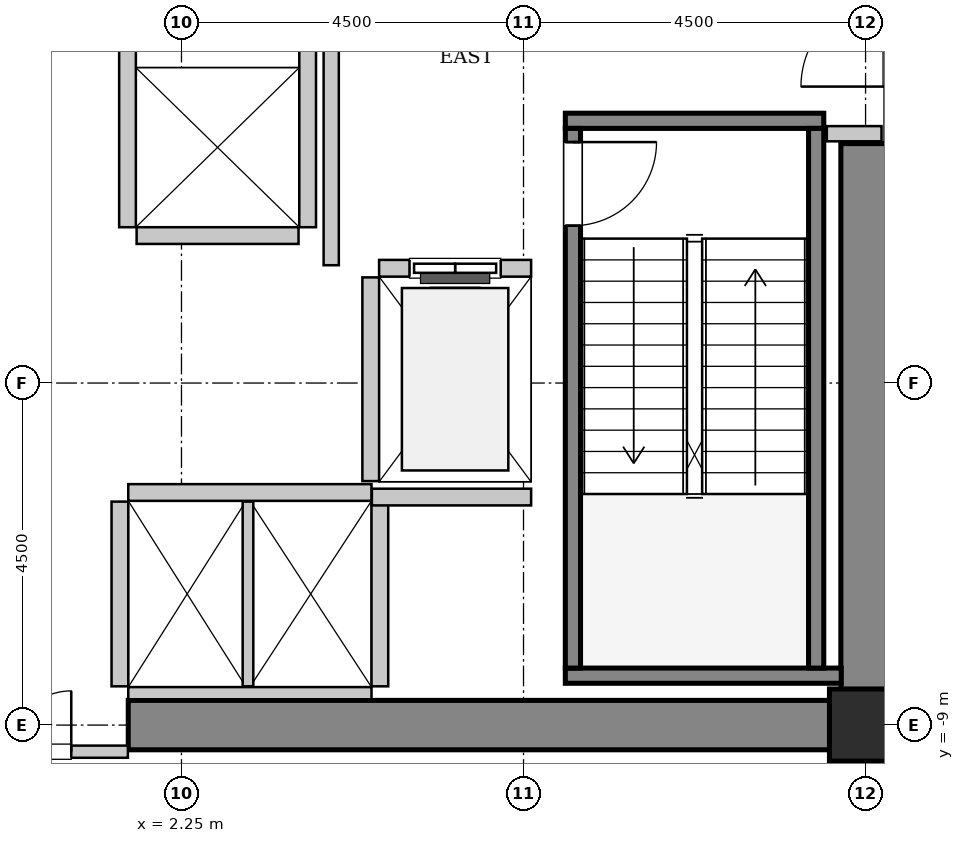
"""IFC4 building model, lengths in metres.
Left out: names, types, materials, properties, quantities, classifications, styles, units other than length and angle.
Written with IfcOpenShell. Run it as: python <this file> out.ifc"""

import sys

from ifc_helpers import new_model, si_unit, direction, frame, frame_2d, origin, origin_2d, place, context, subcontext, project, spatial, rectangle, hollow_rectangle, extrude, source, transform, mapped, element, fill, save


model = new_model("IFC4")
c1 = context("Model", 3, precision=1e-05, world=origin(), true_north=direction((0.0, 1.0)))
c2 = subcontext(c1, "Body", "Model", "MODEL_VIEW")
j1 = project(units=[si_unit("LENGTHUNIT", "METRE"), si_unit("PLANEANGLEUNIT", "RADIAN")], contexts=[c1])
p1 = place(None, origin())
s1 = spatial("IfcSite", under=j1, at=p1, CompositionType="ELEMENT")
p2 = place(p1, origin())
s2 = spatial("IfcBuilding", under=s1, at=p2, CompositionType="ELEMENT")
p3 = place(p2, frame((0.0, 0.0, 86.2)))
s3 = spatial("IfcBuildingStorey", under=s2, at=p3, CompositionType="ELEMENT", Elevation=86.2)
m1 = source(origin(), c2, "Body", "SweptSolid", [
    extrude(rectangle(XDim=10.025, YDim=0.65, at=frame_2d((5.012, 0.0))), origin(), (0.0, 0.0, 1.0), 4.6),
])
p4 = place(p3, frame((1.55, -9.0, 0.0), z_axis=(0.0, 0.0, 1.0), x_axis=(1.0, 0.0, 0.0)))
e1 = element("IfcWall", 1, at=p4, inside=s3, PredefinedType="SHEAR", context=c2, shape_type="MappedRepresentation", body=[
    mapped(m1, transform((0.0, 0.0, 0.0), x_axis=(1.0, 0.0, 0.0), y_axis=(0.0, 1.0, 0.0), z_axis=(0.0, 0.0, 1.0), scale=1.0)),
])
m2 = source(origin(), c2, "Body", "SweptSolid", [
    extrude(rectangle(XDim=7.325, YDim=0.65, at=frame_2d((3.663, 0.0))), origin(), (0.0, 0.0, 1.0), 4.6),
])
p5 = place(p3, frame((11.25, -8.675, 0.0), z_axis=(0.0, 0.0, 1.0), x_axis=(0.0, 1.0, 0.0)))
e2 = element("IfcWall", 2, at=p5, inside=s3, PredefinedType="SHEAR", context=c2, shape_type="MappedRepresentation", body=[
    mapped(m2, transform((0.0, 0.0, 0.0), x_axis=(1.0, 0.0, 0.0), y_axis=(0.0, 1.0, 0.0), z_axis=(0.0, 0.0, 1.0), scale=1.0)),
])
m3 = source(origin(), c2, "Body", "SweptSolid", [
    extrude(hollow_rectangle(XDim=0.95, YDim=0.95, WallThickness=0.045, InnerFilletRadius=0.045, OuterFilletRadius=0.09, at=origin_2d()), origin(), (0.0, 0.0, 1.0), 4.6),
])
p6 = place(p3, frame((11.25, -9.0, 0.0), z_axis=(0.0, 0.0, 1.0), x_axis=(1.0, 0.0, 0.0)))
e3 = element("IfcColumn", 3, at=p6, inside=s3, PredefinedType="COLUMN", context=c2, shape_type="MappedRepresentation", body=[
    mapped(m3, transform((0.0, 0.0, 0.0), x_axis=(1.0, 0.0, 0.0), y_axis=(0.0, 1.0, 0.0), z_axis=(0.0, 0.0, 1.0), scale=1.0)),
])
m4 = source(origin(), c2, "Body", "SweptSolid", [
    extrude(rectangle(XDim=3.4, YDim=0.2, at=frame_2d((1.7, 0.0))), origin(), (0.0, 0.0, 1.0), 4.6),
])
p7 = place(p3, frame((7.3, -1.05, 0.0), z_axis=(0.0, 0.0, 1.0), x_axis=(1.0, 0.0, 0.0)))
e4 = element("IfcWall", 4, at=p7, inside=s3, PredefinedType="SOLIDWALL", context=c2, shape_type="MappedRepresentation", body=[
    mapped(m4, transform((0.0, 0.0, 0.0), x_axis=(1.0, 0.0, 0.0), y_axis=(0.0, 1.0, 0.0), z_axis=(0.0, 0.0, 1.0), scale=1.0)),
])
m5 = source(origin(), c2, "Body", "SweptSolid", [
    extrude(rectangle(XDim=3.63, YDim=0.2, at=frame_2d((1.815, 0.0))), origin(), (0.0, 0.0, 1.0), 4.6),
])
p8 = place(p3, frame((7.3, -8.35, 0.0), z_axis=(0.0, 0.0, 1.0), x_axis=(1.0, 0.0, 0.0)))
e5 = element("IfcWall", 5, at=p8, inside=s3, PredefinedType="SOLIDWALL", context=c2, shape_type="MappedRepresentation", body=[
    mapped(m5, transform((0.0, 0.0, 0.0), x_axis=(1.0, 0.0, 0.0), y_axis=(0.0, 1.0, 0.0), z_axis=(0.0, 0.0, 1.0), scale=1.0)),
])
m6 = source(origin(), c2, "Body", "SweptSolid", [
    extrude(rectangle(XDim=7.1, YDim=0.2, at=frame_2d((3.55, 0.0))), origin(), (0.0, 0.0, 1.0), 4.6),
])
p9 = place(p3, frame((7.4, -1.15, 0.0), z_axis=(0.0, 0.0, 1.0), x_axis=(0.0, -1.0, 0.0)))
e6 = element("IfcWall", 6, at=p9, inside=s3, PredefinedType="SOLIDWALL", context=c2, shape_type="MappedRepresentation", body=[
    mapped(m6, transform((0.0, 0.0, 0.0), x_axis=(1.0, 0.0, 0.0), y_axis=(0.0, 1.0, 0.0), z_axis=(0.0, 0.0, 1.0), scale=1.0)),
])
p10 = place(p9, frame((0.18, 0.0, 0.0)))
e7 = element("IfcOpeningElement", 7, at=p10, cuts=e6, PredefinedType="OPENING", context=c2, shape_type="SweptSolid", body=[
    extrude(rectangle(XDim=1.1, YDim=2.15, at=frame_2d((0.55, 1.075))), frame((0.0, 0.11, 0.0), z_axis=(0.0, -1.0, 0.0), x_axis=(1.0, 0.0, 0.0)), (0.0, 0.0, 1.0), 0.22),
])
p11 = place(p3, frame((10.6, -1.15, 0.0), z_axis=(0.0, 0.0, 1.0), x_axis=(0.0, -1.0, 0.0)))
e8 = element("IfcWall", 8, at=p11, inside=s3, PredefinedType="SOLIDWALL", context=c2, shape_type="MappedRepresentation", body=[
    mapped(m6, transform((0.0, 0.0, 0.0), x_axis=(1.0, 0.0, 0.0), y_axis=(0.0, 1.0, 0.0), z_axis=(0.0, 0.0, 1.0), scale=1.0)),
])
m7 = source(origin(), c2, "Body", "SweptSolid", [
    extrude(rectangle(XDim=2.0, YDim=0.22, at=frame_2d((1.0, 0.0))), origin(), (0.0, 0.0, 1.0), 4.335),
])
p12 = place(p3, frame((6.85, -2.99, 0.0), z_axis=(0.0, 0.0, 1.0), x_axis=(-1.0, 0.0, 0.0)))
e9 = element("IfcWall", 9, at=p12, inside=s3, PredefinedType="SOLIDWALL", context=c2, shape_type="MappedRepresentation", body=[
    mapped(m7, transform((0.0, 0.0, 0.0), x_axis=(1.0, 0.0, 0.0), y_axis=(0.0, 1.0, 0.0), z_axis=(0.0, 0.0, 1.0), scale=1.0)),
])
p13 = place(p12, frame((0.4, 0.0, 0.0)))
e10 = element("IfcOpeningElement", 10, at=p13, cuts=e9, PredefinedType="OPENING", context=c2, shape_type="SweptSolid", body=[
    extrude(rectangle(XDim=1.2, YDim=2.2, at=frame_2d((0.6, 1.1))), frame((0.0, 0.12, 0.0), z_axis=(0.0, -1.0, 0.0), x_axis=(1.0, 0.0, 0.0)), (0.0, 0.0, 1.0), 0.24),
])
m8 = source(origin(), c2, "Body", "SweptSolid", [
    extrude(rectangle(XDim=2.68, YDim=0.22, at=frame_2d((1.34, 0.0))), origin(), (0.0, 0.0, 1.0), 4.335),
])
p14 = place(p3, frame((4.74, -3.11, 0.0), z_axis=(0.0, 0.0, 1.0), x_axis=(0.0, -1.0, 0.0)))
e11 = element("IfcWall", 11, at=p14, inside=s3, PredefinedType="SOLIDWALL", context=c2, shape_type="MappedRepresentation", body=[
    mapped(m8, transform((0.0, 0.0, 0.0), x_axis=(1.0, 0.0, 0.0), y_axis=(0.0, 1.0, 0.0), z_axis=(0.0, 0.0, 1.0), scale=1.0)),
])
m9 = source(origin(), c2, "Body", "SweptSolid", [
    extrude(rectangle(XDim=3.2, YDim=0.22, at=frame_2d((1.6, 0.0))), origin(), (0.0, 0.0, 1.0), 4.335),
])
p15 = place(p3, frame((4.75, -5.94, 0.0), z_axis=(0.0, 0.0, 1.0), x_axis=(-1.0, 0.0, 0.0)))
e12 = element("IfcWall", 12, at=p15, inside=s3, PredefinedType="SOLIDWALL", context=c2, shape_type="MappedRepresentation", body=[
    mapped(m9, transform((0.0, 0.0, 0.0), x_axis=(1.0, 0.0, 0.0), y_axis=(0.0, 1.0, 0.0), z_axis=(0.0, 0.0, 1.0), scale=1.0)),
])
m10 = source(origin(), c2, "Body", "SweptSolid", [
    extrude(rectangle(XDim=3.2, YDim=0.16, at=frame_2d((1.6, 0.0))), origin(), (0.0, 0.0, 1.0), 3.225),
])
p16 = place(p3, frame((1.55, -8.58, 0.0), z_axis=(0.0, 0.0, 1.0), x_axis=(1.0, 0.0, 0.0)))
e13 = element("IfcWall", 13, at=p16, inside=s3, PredefinedType="PARTITIONING", context=c2, shape_type="MappedRepresentation", body=[
    mapped(m10, transform((0.0, 0.0, 0.0), x_axis=(1.0, 0.0, 0.0), y_axis=(0.0, 1.0, 0.0), z_axis=(0.0, 0.0, 1.0), scale=1.0)),
])
m11 = source(origin(), c2, "Body", "SweptSolid", [
    extrude(rectangle(XDim=2.43, YDim=0.22, at=frame_2d((1.215, 0.0))), origin(), (0.0, 0.0, 1.0), 4.335),
])
p17 = place(p3, frame((1.44, -6.06, 0.0), z_axis=(0.0, 0.0, 1.0), x_axis=(0.0, -1.0, 0.0)))
e14 = element("IfcWall", 14, at=p17, inside=s3, PredefinedType="SOLIDWALL", context=c2, shape_type="MappedRepresentation", body=[
    mapped(m11, transform((0.0, 0.0, 0.0), x_axis=(1.0, 0.0, 0.0), y_axis=(0.0, 1.0, 0.0), z_axis=(0.0, 0.0, 1.0), scale=1.0)),
])
m12 = source(origin(), c2, "Body", "SweptSolid", [
    extrude(rectangle(XDim=2.43, YDim=0.14, at=frame_2d((1.215, 0.0))), origin(), (0.0, 0.0, 1.0), 4.335),
])
p18 = place(p3, frame((3.125, -8.49, 0.0), z_axis=(0.0, 0.0, 1.0), x_axis=(0.0, 1.0, 0.0)))
e15 = element("IfcWall", 15, at=p18, inside=s3, PredefinedType="PARTITIONING", context=c2, shape_type="MappedRepresentation", body=[
    mapped(m12, transform((0.0, 0.0, 0.0), x_axis=(1.0, 0.0, 0.0), y_axis=(0.0, 1.0, 0.0), z_axis=(0.0, 0.0, 1.0), scale=1.0)),
])
p19 = place(p3, frame((4.86, -8.49, 0.0), z_axis=(0.0, 0.0, 1.0), x_axis=(0.0, 1.0, 0.0)))
e16 = element("IfcWall", 16, at=p19, inside=s3, PredefinedType="SOLIDWALL", context=c2, shape_type="MappedRepresentation", body=[
    mapped(m11, transform((0.0, 0.0, 0.0), x_axis=(1.0, 0.0, 0.0), y_axis=(0.0, 1.0, 0.0), z_axis=(0.0, 0.0, 1.0), scale=1.0)),
])
m13 = source(origin(), c2, "Body", "SweptSolid", [
    extrude(rectangle(XDim=4.9, YDim=0.22, at=frame_2d((2.45, 0.0))), origin(), (0.0, 0.0, 1.0), 4.335),
])
for number, where, z_axis, x_axis in (
    (17, (1.54, 2.45, 0.0), (0.0, 0.0, 1.0), (0.0, -1.0, 0.0)),
    (18, (3.91, -2.45, 0.0), (0.0, 0.0, 1.0), (0.0, 1.0, 0.0)),
):
    element("IfcWall", number, at=place(p3, frame(where, z_axis=z_axis, x_axis=x_axis)), inside=s3, PredefinedType="SOLIDWALL", context=c2, shape_type="MappedRepresentation", body=[
        mapped(m13, transform((0.0, 0.0, 0.0), x_axis=(1.0, 0.0, 0.0), y_axis=(0.0, 1.0, 0.0), z_axis=(0.0, 0.0, 1.0), scale=1.0)),
    ])
m14 = source(origin(), c2, "Body", "SweptSolid", [
    extrude(rectangle(XDim=2.13, YDim=0.22, at=frame_2d((1.065, 0.0))), origin(), (0.0, 0.0, 1.0), 4.335),
])
p20 = place(p3, frame((1.66, -2.56, 0.0), z_axis=(0.0, 0.0, 1.0), x_axis=(1.0, 0.0, 0.0)))
e19 = element("IfcWall", 19, at=p20, inside=s3, PredefinedType="SOLIDWALL", context=c2, shape_type="MappedRepresentation", body=[
    mapped(m14, transform((0.0, 0.0, 0.0), x_axis=(1.0, 0.0, 0.0), y_axis=(0.0, 1.0, 0.0), z_axis=(0.0, 0.0, 1.0), scale=1.0)),
])
m15 = source(origin(), c2, "Body", "SweptSolid", [
    extrude(rectangle(XDim=2.095, YDim=0.22, at=frame_2d((1.048, 0.0))), origin(), (0.0, 0.0, 1.0), 4.335),
])
p21 = place(p3, frame((4.755, -6.0, 0.0), z_axis=(0.0, 0.0, 1.0), x_axis=(1.0, 0.0, 0.0)))
e20 = element("IfcWall", 20, at=p21, inside=s3, PredefinedType="SOLIDWALL", context=c2, shape_type="MappedRepresentation", body=[
    mapped(m15, transform((0.0, 0.0, 0.0), x_axis=(1.0, 0.0, 0.0), y_axis=(0.0, 1.0, 0.0), z_axis=(0.0, 0.0, 1.0), scale=1.0)),
])
m16 = source(origin(), c2, "Body", "SweptSolid", [
    extrude(rectangle(XDim=5.9, YDim=0.2, at=frame_2d((2.95, 0.0))), origin(), (0.0, 0.0, 1.0), 4.335),
])
p22 = place(p3, frame((4.22, -2.95, 0.0), z_axis=(0.0, 0.0, 1.0), x_axis=(0.0, 1.0, 0.0)))
e21 = element("IfcWall", 21, at=p22, inside=s3, PredefinedType="PARTITIONING", context=c2, shape_type="MappedRepresentation", body=[
    mapped(m16, transform((0.0, 0.0, 0.0), x_axis=(1.0, 0.0, 0.0), y_axis=(0.0, 1.0, 0.0), z_axis=(0.0, 0.0, 1.0), scale=1.0)),
])
m17 = source(origin(), c2, "Body", "SweptSolid", [
    extrude(rectangle(XDim=0.72, YDim=0.2, at=frame_2d((0.36, 0.0))), origin(), (0.0, 0.0, 1.0), 4.335),
])
p23 = place(p3, frame((10.74, -1.22, 0.0), z_axis=(0.0, 0.0, 1.0), x_axis=(1.0, 0.0, 0.0)))
e22 = element("IfcWall", 22, at=p23, inside=s3, PredefinedType="PARTITIONING", context=c2, shape_type="MappedRepresentation", body=[
    mapped(m17, transform((0.0, 0.0, 0.0), x_axis=(1.0, 0.0, 0.0), y_axis=(0.0, 1.0, 0.0), z_axis=(0.0, 0.0, 1.0), scale=1.0)),
])
m18 = source(origin(), c2, "Body", "SweptSolid", [
    extrude(rectangle(XDim=3.09, YDim=0.16, at=frame_2d((1.545, 0.0))), origin(), (0.0, 0.0, 1.0), 3.225),
])
p24 = place(p3, frame((-1.545, -9.35, 0.0), z_axis=(0.0, 0.0, 1.0), x_axis=(1.0, 0.0, 0.0)))
e23 = element("IfcWall", 23, at=p24, inside=s3, PredefinedType="PARTITIONING", context=c2, shape_type="MappedRepresentation", body=[
    mapped(m18, transform((0.0, 0.0, 0.0), x_axis=(1.0, 0.0, 0.0), y_axis=(0.0, 1.0, 0.0), z_axis=(0.0, 0.0, 1.0), scale=1.0)),
])
p25 = place(p24, frame((0.745, 0.0, 0.0)))
e24 = element("IfcOpeningElement", 24, at=p25, cuts=e23, PredefinedType="OPENING", context=c2, shape_type="SweptSolid", body=[
    extrude(rectangle(XDim=1.6, YDim=2.3, at=frame_2d((0.8, 1.15))), frame((0.0, 0.09, 0.0), z_axis=(0.0, -1.0, 0.0), x_axis=(1.0, 0.0, 0.0)), (0.0, 0.0, 1.0), 0.18),
])
m19 = source(origin(), c2, "Body", "SweptSolid", [
    extrude(rectangle(XDim=1.1, YDim=2.15, at=frame_2d((0.55, 1.075))), frame((0.0, 0.025, 0.0), z_axis=(0.0, -1.0, 0.0), x_axis=(1.0, 0.0, 0.0)), (0.0, 0.0, 1.0), 0.05),
])
p26 = place(p10, origin())
e25 = element("IfcDoor", 25, at=p26, inside=s3, OperationType="SINGLE_SWING_LEFT", PredefinedType="DOOR", context=c2, shape_type="MappedRepresentation", body=[
    mapped(m19, transform((0.0, 0.0, 0.0), x_axis=(1.0, 0.0, 0.0), y_axis=(0.0, 1.0, 0.0), z_axis=(0.0, 0.0, 1.0), scale=1.0)),
])
fill(e7, e25)
m20 = source(origin(), c2, "Body", "SweptSolid", [
    extrude(rectangle(XDim=1.2, YDim=2.2, at=frame_2d((0.6, 1.1))), frame((0.0, 0.025, 0.0), z_axis=(0.0, -1.0, 0.0), x_axis=(1.0, 0.0, 0.0)), (0.0, 0.0, 1.0), 0.05),
])
p27 = place(p13, origin())
e26 = element("IfcDoor", 26, at=p27, inside=s3, OperationType="SLIDING_TO_LEFT", PredefinedType="DOOR", context=c2, shape_type="MappedRepresentation", body=[
    mapped(m20, transform((0.0, 0.0, 0.0), x_axis=(1.0, 0.0, 0.0), y_axis=(0.0, 1.0, 0.0), z_axis=(0.0, 0.0, 1.0), scale=1.0)),
])
fill(e10, e26)
m21 = source(origin(), c2, "Body", "SweptSolid", [
    extrude(rectangle(XDim=1.6, YDim=2.3, at=frame_2d((0.8, 1.15))), frame((0.0, 0.025, 0.0), z_axis=(0.0, -1.0, 0.0), x_axis=(1.0, 0.0, 0.0)), (0.0, 0.0, 1.0), 0.05),
])
p28 = place(p25, origin())
e27 = element("IfcDoor", 27, at=p28, inside=s3, OperationType="DOUBLE_DOOR_SINGLE_SWING", PredefinedType="DOOR", context=c2, shape_type="MappedRepresentation", body=[
    mapped(m21, transform((0.0, 0.0, 0.0), x_axis=(1.0, 0.0, 0.0), y_axis=(0.0, 1.0, 0.0), z_axis=(0.0, 0.0, 1.0), scale=1.0)),
])
fill(e24, e27)
save(model, sys.argv[1])
